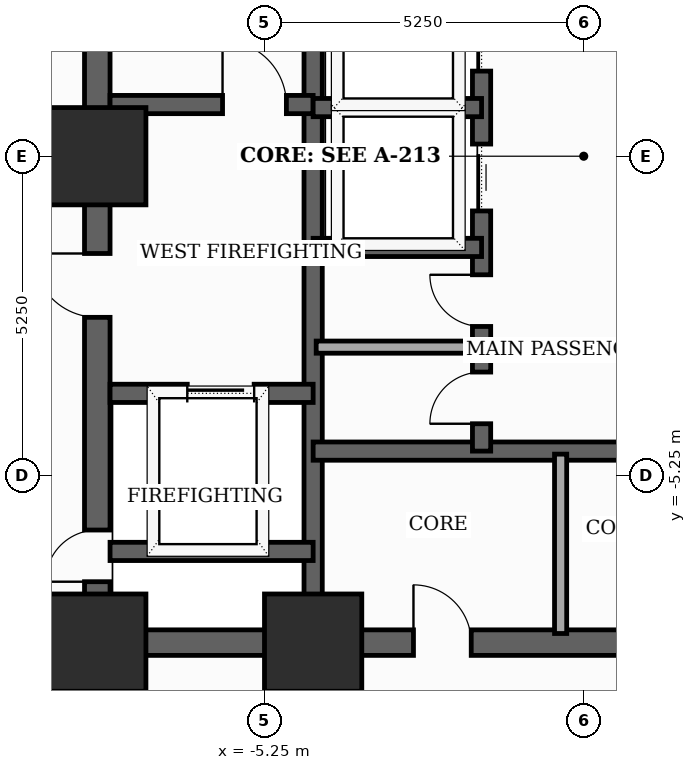
"""IFC4 building model, lengths in metres.
Left out: names, types, materials, properties, quantities, classifications, styles, units other than length and angle.
Written with IfcOpenShell. Run it as: python <this file> out.ifc"""

import sys

from ifc_helpers import new_model, si_unit, direction, frame, frame_2d, origin, origin_2d, place, context, subcontext, project, spatial, rectangle, extrude, element, fill, save


model = new_model("IFC4")
c1 = context("Model", 3, precision=1e-05, world=origin(), true_north=direction((0.0, 1.0)))
c2 = subcontext(c1, "Body", "Model", "MODEL_VIEW")
j1 = project(units=[si_unit("LENGTHUNIT", "METRE"), si_unit("PLANEANGLEUNIT", "RADIAN")], contexts=[c1])
p1 = place(None, origin())
s1 = spatial("IfcSite", under=j1, at=p1, CompositionType="ELEMENT")
p2 = place(p1, origin())
s2 = spatial("IfcBuilding", under=s1, at=p2, CompositionType="ELEMENT")
p3 = place(p2, frame((0.0, 0.0, 37.1)))
s3 = spatial("IfcBuildingStorey", under=s2, at=p3, CompositionType="ELEMENT", Elevation=37.1)
for number, where, z_axis, x_axis in (
    (1, (-8.0, -8.0, 0.0), (0.0, 0.0, 1.0), (1.0, 0.0, 0.0)),
    (2, (-4.45, -8.0, 0.0), (0.0, 0.0, 1.0), (1.0, 0.0, 0.0)),
    (3, (-8.0, 0.0, 0.0), (0.0, 0.0, 1.0), (1.0, 0.0, 0.0)),
):
    element("IfcColumn", number, at=place(p3, frame(where, z_axis=z_axis, x_axis=x_axis)), inside=s3, PredefinedType="COLUMN", context=c2, shape_type="SweptSolid", body=[
        extrude(rectangle(XDim=1.6, YDim=1.6, at=origin_2d()), origin(), (0.0, 0.0, 1.0), 3.7),
    ])
p4 = place(p3, frame((-8.0, -8.0, 0.0), z_axis=(0.0, 0.0, 1.0), x_axis=(0.0, 1.0, 0.0)))
e4 = element("IfcWall", 4, at=p4, inside=s3, PredefinedType="SHEAR", context=c2, shape_type="SweptSolid", body=[
    extrude(rectangle(XDim=16.0, YDim=0.42, at=frame_2d((8.0, 0.0))), origin(), (0.0, 0.0, 1.0), 3.5),
])
p5 = place(p4, frame((1.002, 0.0, 0.0)))
e5 = element("IfcOpeningElement", 5, at=p5, cuts=e4, PredefinedType="OPENING", context=c2, shape_type="SweptSolid", body=[
    extrude(rectangle(XDim=0.85, YDim=2.02, at=frame_2d((0.425, 1.01))), frame((0.0, 0.22, 0.0), z_axis=(0.0, -1.0, 0.0), x_axis=(1.0, 0.0, 0.0)), (0.0, 0.0, 1.0), 0.44),
])
p6 = place(p4, frame((5.35, 0.0, 0.0)))
e6 = element("IfcOpeningElement", 6, at=p6, cuts=e4, PredefinedType="OPENING", context=c2, shape_type="SweptSolid", body=[
    extrude(rectangle(XDim=1.05, YDim=2.15, at=frame_2d((0.525, 1.075))), frame((0.0, 0.22, 0.0), z_axis=(0.0, -1.0, 0.0), x_axis=(1.0, 0.0, 0.0)), (0.0, 0.0, 1.0), 0.44),
])
p7 = place(p3, frame((-8.0, -8.0, 0.0), z_axis=(0.0, 0.0, 1.0), x_axis=(1.0, 0.0, 0.0)))
e7 = element("IfcWall", 7, at=p7, inside=s3, PredefinedType="SHEAR", context=c2, shape_type="SweptSolid", body=[
    extrude(rectangle(XDim=16.0, YDim=0.42, at=frame_2d((8.0, 0.0))), origin(), (0.0, 0.0, 1.0), 3.5),
])
p8 = place(p7, frame((5.2, 0.0, 0.0)))
e8 = element("IfcOpeningElement", 8, at=p8, cuts=e7, PredefinedType="OPENING", context=c2, shape_type="SweptSolid", body=[
    extrude(rectangle(XDim=0.95, YDim=2.1, at=frame_2d((0.475, 1.05))), frame((0.0, 0.22, 0.0), z_axis=(0.0, -1.0, 0.0), x_axis=(1.0, 0.0, 0.0)), (0.0, 0.0, 1.0), 0.44),
])
p9 = place(p7, frame((9.8, 0.0, 0.0)))
e9 = element("IfcOpeningElement", 9, at=p9, cuts=e7, PredefinedType="OPENING", context=c2, shape_type="SweptSolid", body=[
    extrude(rectangle(XDim=0.95, YDim=2.1, at=frame_2d((0.475, 1.05))), frame((0.0, 0.22, 0.0), z_axis=(0.0, -1.0, 0.0), x_axis=(1.0, 0.0, 0.0)), (0.0, 0.0, 1.0), 0.44),
])
p10 = place(p3, frame((-4.45, -7.79, 0.0), z_axis=(0.0, 0.0, 1.0), x_axis=(0.0, 1.0, 0.0)))
e10 = element("IfcWall", 10, at=p10, inside=s3, PredefinedType="SHEAR", context=c2, shape_type="SweptSolid", body=[
    extrude(rectangle(XDim=15.58, YDim=0.3, at=frame_2d((7.79, 0.0))), origin(), (0.0, 0.0, 1.0), 3.5),
])
p11 = place(p3, frame((-7.79, 0.85, 0.0), z_axis=(0.0, 0.0, 1.0), x_axis=(1.0, 0.0, 0.0)))
e11 = element("IfcWall", 11, at=p11, inside=s3, PredefinedType="SHEAR", context=c2, shape_type="SweptSolid", body=[
    extrude(rectangle(XDim=3.34, YDim=0.3, at=frame_2d((1.67, 0.0))), origin(), (0.0, 0.0, 1.0), 3.5),
])
p12 = place(p11, frame((1.85, 0.0, 0.0)))
e12 = element("IfcOpeningElement", 12, at=p12, cuts=e11, PredefinedType="OPENING", context=c2, shape_type="SweptSolid", body=[
    extrude(rectangle(XDim=1.05, YDim=2.15, at=frame_2d((0.525, 1.075))), frame((0.0, 0.16, 0.0), z_axis=(0.0, -1.0, 0.0), x_axis=(1.0, 0.0, 0.0)), (0.0, 0.0, 1.0), 0.32),
])
p13 = place(p3, frame((-7.79, -3.9, 0.0), z_axis=(0.0, 0.0, 1.0), x_axis=(1.0, 0.0, 0.0)))
e13 = element("IfcWall", 13, at=p13, inside=s3, PredefinedType="SHEAR", context=c2, shape_type="SweptSolid", body=[
    extrude(rectangle(XDim=3.34, YDim=0.3, at=frame_2d((1.67, 0.0))), origin(), (0.0, 0.0, 1.0), 3.5),
])
p14 = place(p13, frame((1.27, 0.0, 0.0)))
e14 = element("IfcOpeningElement", 14, at=p14, cuts=e13, PredefinedType="OPENING", context=c2, shape_type="SweptSolid", body=[
    extrude(rectangle(XDim=1.1, YDim=2.1, at=frame_2d((0.55, 1.05))), frame((0.0, 0.16, 0.0), z_axis=(0.0, -1.0, 0.0), x_axis=(1.0, 0.0, 0.0)), (0.0, 0.0, 1.0), 0.32),
])
p15 = place(p3, frame((-7.79, -6.5, 0.0), z_axis=(0.0, 0.0, 1.0), x_axis=(1.0, 0.0, 0.0)))
e15 = element("IfcWall", 15, at=p15, inside=s3, PredefinedType="SHEAR", context=c2, shape_type="SweptSolid", body=[
    extrude(rectangle(XDim=3.34, YDim=0.3, at=frame_2d((1.67, 0.0))), origin(), (0.0, 0.0, 1.0), 3.5),
])
p16 = place(p3, frame((-4.45, -4.85, 0.0), z_axis=(0.0, 0.0, 1.0), x_axis=(1.0, 0.0, 0.0)))
e16 = element("IfcWall", 16, at=p16, inside=s3, PredefinedType="SHEAR", context=c2, shape_type="SweptSolid", body=[
    extrude(rectangle(XDim=8.9, YDim=0.3, at=frame_2d((4.45, 0.0))), origin(), (0.0, 0.0, 1.0), 3.5),
])
p17 = place(p3, frame((-1.68, -4.85, 0.0), z_axis=(0.0, 0.0, 1.0), x_axis=(0.0, 1.0, 0.0)))
e17 = element("IfcWall", 17, at=p17, inside=s3, PredefinedType="SHEAR", context=c2, shape_type="SweptSolid", body=[
    extrude(rectangle(XDim=12.64, YDim=0.3, at=frame_2d((6.32, 0.0))), origin(), (0.0, 0.0, 1.0), 3.5),
])
p18 = place(p17, frame((3.95, 0.0, 0.0)))
e18 = element("IfcOpeningElement", 18, at=p18, cuts=e17, PredefinedType="OPENING", context=c2, shape_type="SweptSolid", body=[
    extrude(rectangle(XDim=1.1, YDim=2.1, at=frame_2d((0.55, 1.05))), frame((0.0, 0.16, 0.0), z_axis=(0.0, -1.0, 0.0), x_axis=(1.0, 0.0, 0.0)), (0.0, 0.0, 1.0), 0.32),
])
p19 = place(p17, frame((6.25, 0.0, 0.0)))
e19 = element("IfcOpeningElement", 19, at=p19, cuts=e17, PredefinedType="OPENING", context=c2, shape_type="SweptSolid", body=[
    extrude(rectangle(XDim=1.1, YDim=2.1, at=frame_2d((0.55, 1.05))), frame((0.0, 0.16, 0.0), z_axis=(0.0, -1.0, 0.0), x_axis=(1.0, 0.0, 0.0)), (0.0, 0.0, 1.0), 0.32),
])
p20 = place(p17, frame((8.55, 0.0, 0.0)))
e20 = element("IfcOpeningElement", 20, at=p20, cuts=e17, PredefinedType="OPENING", context=c2, shape_type="SweptSolid", body=[
    extrude(rectangle(XDim=1.1, YDim=2.1, at=frame_2d((0.55, 1.05))), frame((0.0, 0.16, 0.0), z_axis=(0.0, -1.0, 0.0), x_axis=(1.0, 0.0, 0.0)), (0.0, 0.0, 1.0), 0.32),
])
p21 = place(p17, frame((10.85, 0.0, 0.0)))
e21 = element("IfcOpeningElement", 21, at=p21, cuts=e17, PredefinedType="OPENING", context=c2, shape_type="SweptSolid", body=[
    extrude(rectangle(XDim=1.1, YDim=2.1, at=frame_2d((0.55, 1.05))), frame((0.0, 0.16, 0.0), z_axis=(0.0, -1.0, 0.0), x_axis=(1.0, 0.0, 0.0)), (0.0, 0.0, 1.0), 0.32),
])
p22 = place(p17, frame((0.45, 0.0, 0.0)))
e22 = element("IfcOpeningElement", 22, at=p22, cuts=e17, PredefinedType="OPENING", context=c2, shape_type="SweptSolid", body=[
    extrude(rectangle(XDim=0.85, YDim=2.02, at=frame_2d((0.425, 1.01))), frame((0.0, 0.16, 0.0), z_axis=(0.0, -1.0, 0.0), x_axis=(1.0, 0.0, 0.0)), (0.0, 0.0, 1.0), 0.32),
])
p23 = place(p17, frame((2.05, 0.0, 0.0)))
e23 = element("IfcOpeningElement", 23, at=p23, cuts=e17, PredefinedType="OPENING", context=c2, shape_type="SweptSolid", body=[
    extrude(rectangle(XDim=0.85, YDim=2.02, at=frame_2d((0.425, 1.01))), frame((0.0, 0.16, 0.0), z_axis=(0.0, -1.0, 0.0), x_axis=(1.0, 0.0, 0.0)), (0.0, 0.0, 1.0), 0.32),
])
for number, where, z_axis, x_axis in (
    (24, (-4.45, -1.5, 0.0), (0.0, 0.0, 1.0), (1.0, 0.0, 0.0)),
    (25, (-4.45, 0.8, 0.0), (0.0, 0.0, 1.0), (1.0, 0.0, 0.0)),
):
    element("IfcWall", number, at=place(p3, frame(where, z_axis=z_axis, x_axis=x_axis)), inside=s3, PredefinedType="SHEAR", context=c2, shape_type="SweptSolid", body=[
        extrude(rectangle(XDim=2.77, YDim=0.3, at=frame_2d((1.385, 0.0))), origin(), (0.0, 0.0, 1.0), 3.5),
    ])
p24 = place(p3, frame((-0.38, -7.85, 0.0), z_axis=(0.0, 0.0, 1.0), x_axis=(0.0, 1.0, 0.0)))
e26 = element("IfcWall", 26, at=p24, inside=s3, PredefinedType="SOLIDWALL", context=c2, shape_type="SweptSolid", body=[
    extrude(rectangle(XDim=2.95, YDim=0.2, at=frame_2d((1.475, 0.0))), origin(), (0.0, 0.0, 1.0), 2.885),
])
p25 = place(p3, frame((-4.4, -3.14, 0.0), z_axis=(0.0, 0.0, 1.0), x_axis=(1.0, 0.0, 0.0)))
e27 = element("IfcWall", 27, at=p25, inside=s3, PredefinedType="SOLIDWALL", context=c2, shape_type="SweptSolid", body=[
    extrude(rectangle(XDim=2.68, YDim=0.2, at=frame_2d((1.34, 0.0))), origin(), (0.0, 0.0, 1.0), 3.5),
])
p26 = place(p5, origin())
e28 = element("IfcDoor", 28, at=p26, inside=s3, OperationType="SINGLE_SWING_LEFT", PredefinedType="TRAPDOOR", context=c2, shape_type="SweptSolid", body=[
    extrude(rectangle(XDim=0.85, YDim=2.02, at=frame_2d((0.425, 1.01))), frame((0.0, 0.025, 0.0), z_axis=(0.0, -1.0, 0.0), x_axis=(1.0, 0.0, 0.0)), (0.0, 0.0, 1.0), 0.05),
])
fill(e5, e28)
p27 = place(p6, origin())
e29 = element("IfcDoor", 29, at=p27, inside=s3, OperationType="SINGLE_SWING_RIGHT", PredefinedType="DOOR", context=c2, shape_type="SweptSolid", body=[
    extrude(rectangle(XDim=1.05, YDim=2.15, at=frame_2d((0.525, 1.075))), frame((0.0, 0.025, 0.0), z_axis=(0.0, -1.0, 0.0), x_axis=(1.0, 0.0, 0.0)), (0.0, 0.0, 1.0), 0.05),
])
fill(e6, e29)
p28 = place(p8, origin())
e30 = element("IfcDoor", 30, at=p28, inside=s3, OperationType="SINGLE_SWING_LEFT", PredefinedType="DOOR", context=c2, shape_type="SweptSolid", body=[
    extrude(rectangle(XDim=0.95, YDim=2.1, at=frame_2d((0.475, 1.05))), frame((0.0, 0.025, 0.0), z_axis=(0.0, -1.0, 0.0), x_axis=(1.0, 0.0, 0.0)), (0.0, 0.0, 1.0), 0.05),
])
fill(e8, e30)
p29 = place(p12, origin())
e31 = element("IfcDoor", 31, at=p29, inside=s3, OperationType="SINGLE_SWING_LEFT", PredefinedType="DOOR", context=c2, shape_type="SweptSolid", body=[
    extrude(rectangle(XDim=1.05, YDim=2.15, at=frame_2d((0.525, 1.075))), frame((0.0, 0.025, 0.0), z_axis=(0.0, -1.0, 0.0), x_axis=(1.0, 0.0, 0.0)), (0.0, 0.0, 1.0), 0.05),
])
fill(e12, e31)
p30 = place(p14, origin())
e32 = element("IfcDoor", 32, at=p30, inside=s3, OperationType="SLIDING_TO_LEFT", PredefinedType="DOOR", context=c2, shape_type="SweptSolid", body=[
    extrude(rectangle(XDim=1.1, YDim=2.1, at=frame_2d((0.55, 1.05))), frame((0.0, 0.025, 0.0), z_axis=(0.0, -1.0, 0.0), x_axis=(1.0, 0.0, 0.0)), (0.0, 0.0, 1.0), 0.05),
])
fill(e14, e32)
p31 = place(p18, origin())
e33 = element("IfcDoor", 33, at=p31, inside=s3, OperationType="SLIDING_TO_LEFT", PredefinedType="DOOR", context=c2, shape_type="SweptSolid", body=[
    extrude(rectangle(XDim=1.1, YDim=2.1, at=frame_2d((0.55, 1.05))), frame((0.0, 0.025, 0.0), z_axis=(0.0, -1.0, 0.0), x_axis=(1.0, 0.0, 0.0)), (0.0, 0.0, 1.0), 0.05),
])
fill(e18, e33)
p32 = place(p19, origin())
e34 = element("IfcDoor", 34, at=p32, inside=s3, OperationType="SLIDING_TO_LEFT", PredefinedType="DOOR", context=c2, shape_type="SweptSolid", body=[
    extrude(rectangle(XDim=1.1, YDim=2.1, at=frame_2d((0.55, 1.05))), frame((0.0, 0.025, 0.0), z_axis=(0.0, -1.0, 0.0), x_axis=(1.0, 0.0, 0.0)), (0.0, 0.0, 1.0), 0.05),
])
fill(e19, e34)
p33 = place(p22, origin())
e35 = element("IfcDoor", 35, at=p33, inside=s3, OperationType="SINGLE_SWING_LEFT", PredefinedType="TRAPDOOR", context=c2, shape_type="SweptSolid", body=[
    extrude(rectangle(XDim=0.85, YDim=2.02, at=frame_2d((0.425, 1.01))), frame((0.0, 0.025, 0.0), z_axis=(0.0, -1.0, 0.0), x_axis=(1.0, 0.0, 0.0)), (0.0, 0.0, 1.0), 0.05),
])
fill(e22, e35)
p34 = place(p23, origin())
e36 = element("IfcDoor", 36, at=p34, inside=s3, OperationType="SINGLE_SWING_RIGHT", PredefinedType="TRAPDOOR", context=c2, shape_type="SweptSolid", body=[
    extrude(rectangle(XDim=0.85, YDim=2.02, at=frame_2d((0.425, 1.01))), frame((0.0, 0.025, 0.0), z_axis=(0.0, -1.0, 0.0), x_axis=(1.0, 0.0, 0.0)), (0.0, 0.0, 1.0), 0.05),
])
fill(e23, e36)
save(model, sys.argv[1])
